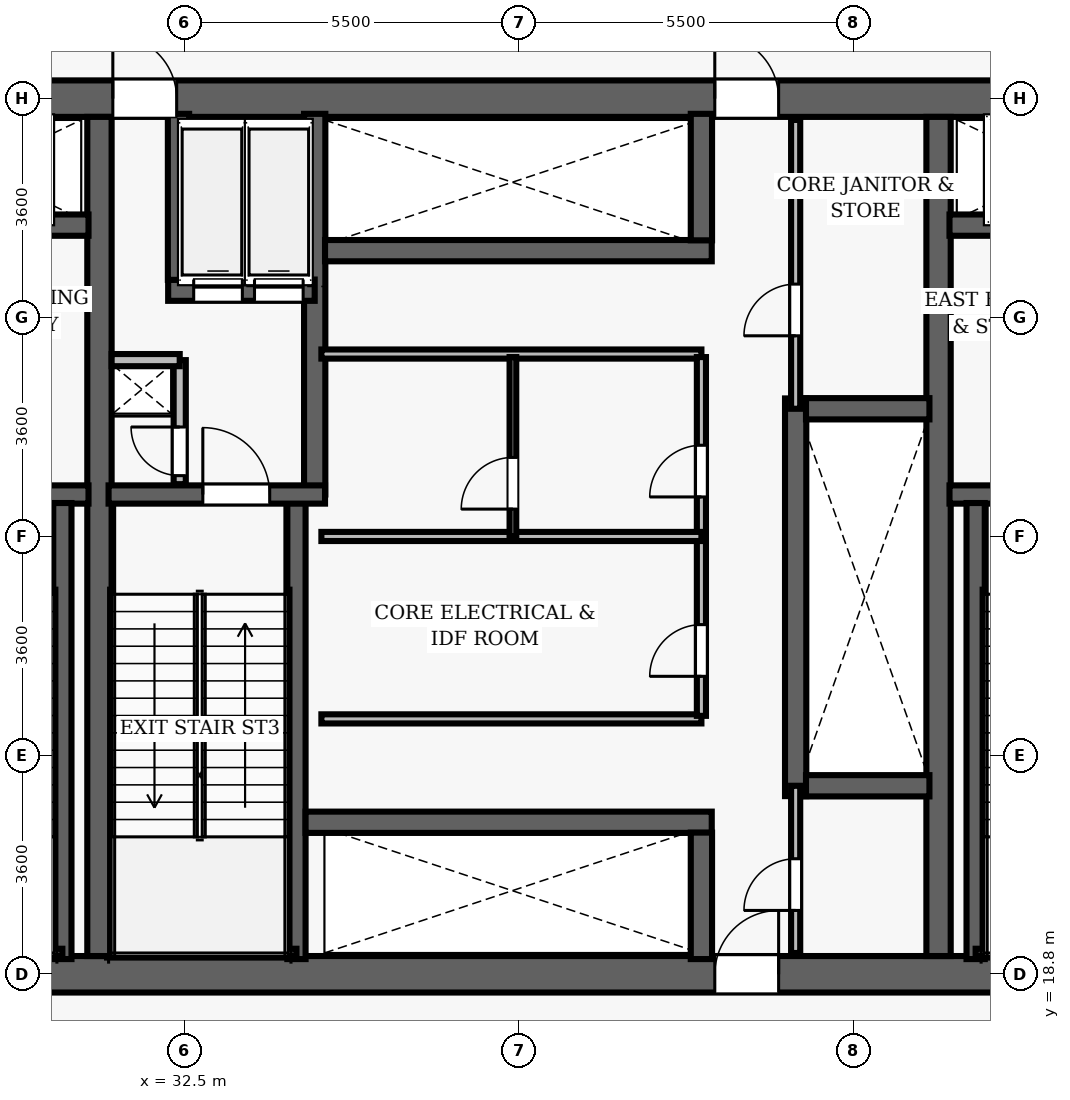
"""IFC4 building model, lengths in metres.
Left out: names, types, materials, properties, quantities, classifications, styles, units other than length and angle.
Written with IfcOpenShell. Run it as: python <this file> out.ifc"""

import sys

from ifc_helpers import new_model, si_unit, direction, frame, frame_2d, origin, place, context, subcontext, project, spatial, rectangle, extrude, element, fill, save


model = new_model("IFC4")
c1 = context("Model", 3, precision=1e-05, world=origin(), true_north=direction((0.0, 1.0)))
c2 = subcontext(c1, "Body", "Model", "MODEL_VIEW")
j1 = project(units=[si_unit("LENGTHUNIT", "METRE"), si_unit("PLANEANGLEUNIT", "RADIAN")], contexts=[c1])
p1 = place(None, origin())
s1 = spatial("IfcSite", under=j1, at=p1, CompositionType="ELEMENT")
p2 = place(p1, origin())
s2 = spatial("IfcBuilding", under=s1, at=p2, CompositionType="ELEMENT")
p3 = place(p2, frame((0.0, 0.0, 30.0)))
s3 = spatial("IfcBuildingStorey", under=s2, at=p3, CompositionType="ELEMENT", Elevation=30.0)
p4 = place(p3, frame((26.7, 18.8, 0.0), z_axis=(0.0, 0.0, 1.0), x_axis=(1.0, 0.0, 0.0)))
e1 = element("IfcWall", 1, at=p4, inside=s3, PredefinedType="SHEAR", context=c2, shape_type="SweptSolid", body=[
    extrude(rectangle(XDim=22.6, YDim=0.6, at=frame_2d((11.3, 0.0))), origin(), (0.0, 0.0, 1.0), 5.4),
])
p5 = place(p4, frame((14.52, 0.0, 0.0)))
e2 = element("IfcOpeningElement", 2, at=p5, cuts=e1, PredefinedType="OPENING", context=c2, shape_type="SweptSolid", body=[
    extrude(rectangle(XDim=1.05, YDim=2.15, at=frame_2d((0.525, 1.075))), frame((0.0, 0.31, 0.0), z_axis=(0.0, -1.0, 0.0), x_axis=(1.0, 0.0, 0.0)), (0.0, 0.0, 1.0), 0.62),
])
p6 = place(p3, frame((26.7, 33.2, 0.0), z_axis=(0.0, 0.0, 1.0), x_axis=(1.0, 0.0, 0.0)))
e3 = element("IfcWall", 3, at=p6, inside=s3, PredefinedType="SHEAR", context=c2, shape_type="SweptSolid", body=[
    extrude(rectangle(XDim=22.6, YDim=0.6, at=frame_2d((11.3, 0.0))), origin(), (0.0, 0.0, 1.0), 5.4),
])
p7 = place(p6, frame((4.62, 0.0, 0.0)))
e4 = element("IfcOpeningElement", 4, at=p7, cuts=e3, PredefinedType="OPENING", context=c2, shape_type="SweptSolid", body=[
    extrude(rectangle(XDim=1.05, YDim=2.15, at=frame_2d((0.525, 1.075))), frame((0.0, 0.31, 0.0), z_axis=(0.0, -1.0, 0.0), x_axis=(1.0, 0.0, 0.0)), (0.0, 0.0, 1.0), 0.62),
])
p8 = place(p6, frame((14.52, 0.0, 0.0)))
e5 = element("IfcOpeningElement", 5, at=p8, cuts=e3, PredefinedType="OPENING", context=c2, shape_type="SweptSolid", body=[
    extrude(rectangle(XDim=1.05, YDim=2.15, at=frame_2d((0.525, 1.075))), frame((0.0, 0.31, 0.0), z_axis=(0.0, -1.0, 0.0), x_axis=(1.0, 0.0, 0.0)), (0.0, 0.0, 1.0), 0.62),
])
for number, where, z_axis, x_axis in (
    (6, (31.1, 19.1, 0.0), (0.0, 0.0, 1.0), (0.0, 1.0, 0.0)),
    (7, (44.9, 19.1, 0.0), (0.0, 0.0, 1.0), (0.0, 1.0, 0.0)),
):
    element("IfcWall", number, at=place(p3, frame(where, z_axis=z_axis, x_axis=x_axis)), inside=s3, PredefinedType="SHEAR", context=c2, shape_type="SweptSolid", body=[
        extrude(rectangle(XDim=13.8, YDim=0.4, at=frame_2d((6.9, 0.0))), origin(), (0.0, 0.0, 1.0), 5.4),
    ])
p9 = place(p3, frame((27.25, 26.69, 0.0), z_axis=(0.0, 0.0, 1.0), x_axis=(1.0, 0.0, 0.0)))
e8 = element("IfcWall", 8, at=p9, inside=s3, PredefinedType="SHEAR", context=c2, shape_type="SweptSolid", body=[
    extrude(rectangle(XDim=3.67, YDim=0.3, at=frame_2d((1.835, 0.0))), origin(), (0.0, 0.0, 1.0), 5.4),
])
p10 = place(p9, frame((1.05, 0.0, 0.0)))
e9 = element("IfcOpeningElement", 9, at=p10, cuts=e8, PredefinedType="OPENING", context=c2, shape_type="SweptSolid", body=[
    extrude(rectangle(XDim=1.1, YDim=2.15, at=frame_2d((0.55, 1.075))), frame((0.0, 0.16, 0.0), z_axis=(0.0, -1.0, 0.0), x_axis=(1.0, 0.0, 0.0)), (0.0, 0.0, 1.0), 0.32),
])
p11 = place(p3, frame((30.49, 19.05, 0.0), z_axis=(0.0, 0.0, 1.0), x_axis=(0.0, 1.0, 0.0)))
e10 = element("IfcWall", 10, at=p11, inside=s3, PredefinedType="SHEAR", context=c2, shape_type="SweptSolid", body=[
    extrude(rectangle(XDim=7.5, YDim=0.3, at=frame_2d((3.75, 0.0))), origin(), (0.0, 0.0, 1.0), 5.4),
])
p12 = place(p3, frame((27.395, 19.16, 0.0), z_axis=(0.0, 0.0, 1.0), x_axis=(1.0, 0.0, 0.0)))
e11 = element("IfcWall", 11, at=p12, inside=s3, PredefinedType="SHEAR", context=c2, shape_type="SweptSolid", body=[
    extrude(rectangle(XDim=3.095, YDim=0.12, at=frame_2d((1.547, 0.0))), origin(), (0.0, 0.0, 1.0), 5.4),
])
p13 = place(p3, frame((27.25, 31.12, 0.0), z_axis=(0.0, 0.0, 1.0), x_axis=(1.0, 0.0, 0.0)))
e12 = element("IfcWall", 12, at=p13, inside=s3, PredefinedType="SHEAR", context=c2, shape_type="SweptSolid", body=[
    extrude(rectangle(XDim=3.67, YDim=0.35, at=frame_2d((1.835, 0.0))), origin(), (0.0, 0.0, 1.0), 4.06),
])
p14 = place(p13, frame((1.25, 0.0, 0.0)))
e13 = element("IfcOpeningElement", 13, at=p14, cuts=e12, PredefinedType="OPENING", context=c2, shape_type="SweptSolid", body=[
    extrude(rectangle(XDim=1.1, YDim=2.15, at=frame_2d((0.55, 1.075))), frame((0.0, 0.185, 0.0), z_axis=(0.0, -1.0, 0.0), x_axis=(1.0, 0.0, 0.0)), (0.0, 0.0, 1.0), 0.37),
])
p15 = place(p3, frame((45.08, 26.69, 0.0), z_axis=(0.0, 0.0, 1.0), x_axis=(1.0, 0.0, 0.0)))
e14 = element("IfcWall", 14, at=p15, inside=s3, PredefinedType="SHEAR", context=c2, shape_type="SweptSolid", body=[
    extrude(rectangle(XDim=3.67, YDim=0.3, at=frame_2d((1.835, 0.0))), origin(), (0.0, 0.0, 1.0), 5.4),
])
p16 = place(p15, frame((1.05, 0.0, 0.0)))
e15 = element("IfcOpeningElement", 15, at=p16, cuts=e14, PredefinedType="OPENING", context=c2, shape_type="SweptSolid", body=[
    extrude(rectangle(XDim=1.1, YDim=2.15, at=frame_2d((0.55, 1.075))), frame((0.0, 0.16, 0.0), z_axis=(0.0, -1.0, 0.0), x_axis=(1.0, 0.0, 0.0)), (0.0, 0.0, 1.0), 0.32),
])
p17 = place(p3, frame((45.51, 19.05, 0.0), z_axis=(0.0, 0.0, 1.0), x_axis=(0.0, 1.0, 0.0)))
e16 = element("IfcWall", 16, at=p17, inside=s3, PredefinedType="SHEAR", context=c2, shape_type="SweptSolid", body=[
    extrude(rectangle(XDim=7.5, YDim=0.3, at=frame_2d((3.75, 0.0))), origin(), (0.0, 0.0, 1.0), 5.4),
])
p18 = place(p3, frame((45.51, 19.16, 0.0), z_axis=(0.0, 0.0, 1.0), x_axis=(1.0, 0.0, 0.0)))
e17 = element("IfcWall", 17, at=p18, inside=s3, PredefinedType="SHEAR", context=c2, shape_type="SweptSolid", body=[
    extrude(rectangle(XDim=3.095, YDim=0.12, at=frame_2d((1.547, 0.0))), origin(), (0.0, 0.0, 1.0), 5.4),
])
p19 = place(p3, frame((45.08, 31.12, 0.0), z_axis=(0.0, 0.0, 1.0), x_axis=(1.0, 0.0, 0.0)))
e18 = element("IfcWall", 18, at=p19, inside=s3, PredefinedType="SHEAR", context=c2, shape_type="SweptSolid", body=[
    extrude(rectangle(XDim=3.67, YDim=0.35, at=frame_2d((1.835, 0.0))), origin(), (0.0, 0.0, 1.0), 4.06),
])
p20 = place(p19, frame((1.25, 0.0, 0.0)))
e19 = element("IfcOpeningElement", 19, at=p20, cuts=e18, PredefinedType="OPENING", context=c2, shape_type="SweptSolid", body=[
    extrude(rectangle(XDim=1.1, YDim=2.15, at=frame_2d((0.55, 1.075))), frame((0.0, 0.185, 0.0), z_axis=(0.0, -1.0, 0.0), x_axis=(1.0, 0.0, 0.0)), (0.0, 0.0, 1.0), 0.37),
])
p21 = place(p3, frame((34.34, 19.05, 0.0), z_axis=(0.0, 0.0, 1.0), x_axis=(0.0, 1.0, 0.0)))
e20 = element("IfcWall", 20, at=p21, inside=s3, PredefinedType="SHEAR", context=c2, shape_type="SweptSolid", body=[
    extrude(rectangle(XDim=7.5, YDim=0.3, at=frame_2d((3.75, 0.0))), origin(), (0.0, 0.0, 1.0), 5.4),
])
p22 = place(p3, frame((34.64, 26.69, 0.0), z_axis=(0.0, 0.0, 1.0), x_axis=(0.0, 1.0, 0.0)))
e21 = element("IfcWall", 21, at=p22, inside=s3, PredefinedType="SHEAR", context=c2, shape_type="SweptSolid", body=[
    extrude(rectangle(XDim=6.26, YDim=0.35, at=frame_2d((3.13, 0.0))), origin(), (0.0, 0.0, 1.0), 5.4),
])
p23 = place(p3, frame((31.25, 26.69, 0.0), z_axis=(0.0, 0.0, 1.0), x_axis=(1.0, 0.0, 0.0)))
e22 = element("IfcWall", 22, at=p23, inside=s3, PredefinedType="SHEAR", context=c2, shape_type="SweptSolid", body=[
    extrude(rectangle(XDim=3.56, YDim=0.3, at=frame_2d((1.78, 0.0))), origin(), (0.0, 0.0, 1.0), 5.4),
])
p24 = place(p23, frame((1.55, 0.0, 0.0)))
e23 = element("IfcOpeningElement", 23, at=p24, cuts=e22, PredefinedType="OPENING", context=c2, shape_type="SweptSolid", body=[
    extrude(rectangle(XDim=1.1, YDim=2.15, at=frame_2d((0.55, 1.075))), frame((0.0, 0.16, 0.0), z_axis=(0.0, -1.0, 0.0), x_axis=(1.0, 0.0, 0.0)), (0.0, 0.0, 1.0), 0.32),
])
p25 = place(p3, frame((31.3, 19.16, 0.0), z_axis=(0.0, 0.0, 1.0), x_axis=(1.0, 0.0, 0.0)))
e24 = element("IfcWall", 24, at=p25, inside=s3, PredefinedType="SHEAR", context=c2, shape_type="SweptSolid", body=[
    extrude(rectangle(XDim=3.04, YDim=0.12, at=frame_2d((1.52, 0.0))), origin(), (0.0, 0.0, 1.0), 5.4),
])
p26 = place(p3, frame((32.23, 30.05, 0.0), z_axis=(0.0, 0.0, 1.0), x_axis=(1.0, 0.0, 0.0)))
e25 = element("IfcWall", 25, at=p26, inside=s3, PredefinedType="SHEAR", context=c2, shape_type="SweptSolid", body=[
    extrude(rectangle(XDim=2.41, YDim=0.35, at=frame_2d((1.205, 0.0))), origin(), (0.0, 0.0, 1.0), 4.06),
])
p27 = place(p26, frame((0.42, 0.0, 0.0)))
e26 = element("IfcOpeningElement", 26, at=p27, cuts=e25, PredefinedType="OPENING", context=c2, shape_type="SweptSolid", body=[
    extrude(rectangle(XDim=0.8, YDim=2.15, at=frame_2d((0.4, 1.075))), frame((0.0, 0.185, 0.0), z_axis=(0.0, -1.0, 0.0), x_axis=(1.0, 0.0, 0.0)), (0.0, 0.0, 1.0), 0.37),
])
p28 = place(p26, frame((1.42, 0.0, 0.0)))
e27 = element("IfcOpeningElement", 27, at=p28, cuts=e25, PredefinedType="OPENING", context=c2, shape_type="SweptSolid", body=[
    extrude(rectangle(XDim=0.8, YDim=2.15, at=frame_2d((0.4, 1.075))), frame((0.0, 0.185, 0.0), z_axis=(0.0, -1.0, 0.0), x_axis=(1.0, 0.0, 0.0)), (0.0, 0.0, 1.0), 0.37),
])
p29 = place(p3, frame((32.4, 30.22, 0.0), z_axis=(0.0, 0.0, 1.0), x_axis=(0.0, 1.0, 0.0)))
e28 = element("IfcWall", 28, at=p29, inside=s3, PredefinedType="SHEAR", context=c2, shape_type="SweptSolid", body=[
    extrude(rectangle(XDim=2.73, YDim=0.35, at=frame_2d((1.365, 0.0))), origin(), (0.0, 0.0, 1.0), 4.06),
])
p30 = place(p3, frame((32.42, 26.86, 0.0), z_axis=(0.0, 0.0, 1.0), x_axis=(0.0, 1.0, 0.0)))
e29 = element("IfcWall", 29, at=p30, inside=s3, PredefinedType="PARTITIONING", context=c2, shape_type="SweptSolid", body=[
    extrude(rectangle(XDim=2.04, YDim=0.2, at=frame_2d((1.02, 0.0))), origin(), (0.0, 0.0, 1.0), 4.06),
])
p31 = place(p30, frame((0.14, 0.0, 0.0)))
e30 = element("IfcOpeningElement", 30, at=p31, cuts=e29, PredefinedType="OPENING", context=c2, shape_type="SweptSolid", body=[
    extrude(rectangle(XDim=0.8, YDim=2.05, at=frame_2d((0.4, 1.025))), frame((0.0, 0.11, 0.0), z_axis=(0.0, -1.0, 0.0), x_axis=(1.0, 0.0, 0.0)), (0.0, 0.0, 1.0), 0.22),
])
p32 = place(p3, frame((31.3, 28.9, 0.0), z_axis=(0.0, 0.0, 1.0), x_axis=(1.0, 0.0, 0.0)))
e31 = element("IfcWall", 31, at=p32, inside=s3, PredefinedType="PARTITIONING", context=c2, shape_type="SweptSolid", body=[
    extrude(rectangle(XDim=1.12, YDim=0.2, at=frame_2d((0.56, 0.0))), origin(), (0.0, 0.0, 1.0), 4.06),
])
p33 = place(p3, frame((42.55, 21.73, 0.0), z_axis=(0.0, 0.0, 1.0), x_axis=(0.0, 1.0, 0.0)))
e32 = element("IfcWall", 32, at=p33, inside=s3, PredefinedType="SHEAR", context=c2, shape_type="SweptSolid", body=[
    extrude(rectangle(XDim=6.54, YDim=0.35, at=frame_2d((3.27, 0.0))), origin(), (0.0, 0.0, 1.0), 4.06),
])
for number, where, z_axis, x_axis in (
    (33, (42.72, 21.9, 0.0), (0.0, 0.0, 1.0), (1.0, 0.0, 0.0)),
    (34, (42.72, 28.1, 0.0), (0.0, 0.0, 1.0), (1.0, 0.0, 0.0)),
):
    element("IfcWall", number, at=place(p3, frame(where, z_axis=z_axis, x_axis=x_axis)), inside=s3, PredefinedType="SHEAR", context=c2, shape_type="SweptSolid", body=[
        extrude(rectangle(XDim=2.03, YDim=0.35, at=frame_2d((1.015, 0.0))), origin(), (0.0, 0.0, 1.0), 4.06),
    ])
p34 = place(p3, frame((34.81, 30.7, 0.0), z_axis=(0.0, 0.0, 1.0), x_axis=(1.0, 0.0, 0.0)))
e35 = element("IfcWall", 35, at=p34, inside=s3, PredefinedType="SHEAR", context=c2, shape_type="SweptSolid", body=[
    extrude(rectangle(XDim=6.36, YDim=0.35, at=frame_2d((3.18, 0.0))), origin(), (0.0, 0.0, 1.0), 4.06),
])
p35 = place(p3, frame((41.0, 30.87, 0.0), z_axis=(0.0, 0.0, 1.0), x_axis=(0.0, 1.0, 0.0)))
e36 = element("IfcWall", 36, at=p35, inside=s3, PredefinedType="SHEAR", context=c2, shape_type="SweptSolid", body=[
    extrude(rectangle(XDim=2.08, YDim=0.35, at=frame_2d((1.04, 0.0))), origin(), (0.0, 0.0, 1.0), 4.06),
])
p36 = place(p3, frame((34.49, 21.3, 0.0), z_axis=(0.0, 0.0, 1.0), x_axis=(1.0, 0.0, 0.0)))
e37 = element("IfcWall", 37, at=p36, inside=s3, PredefinedType="SHEAR", context=c2, shape_type="SweptSolid", body=[
    extrude(rectangle(XDim=6.68, YDim=0.35, at=frame_2d((3.34, 0.0))), origin(), (0.0, 0.0, 1.0), 4.06),
])
p37 = place(p3, frame((41.0, 19.05, 0.0), z_axis=(0.0, 0.0, 1.0), x_axis=(0.0, 1.0, 0.0)))
e38 = element("IfcWall", 38, at=p37, inside=s3, PredefinedType="SHEAR", context=c2, shape_type="SweptSolid", body=[
    extrude(rectangle(XDim=2.08, YDim=0.35, at=frame_2d((1.04, 0.0))), origin(), (0.0, 0.0, 1.0), 4.06),
])
for number, where, z_axis, x_axis in (
    (39, (34.75, 29.0, 0.0), (0.0, 0.0, 1.0), (1.0, 0.0, 0.0)),
    (40, (34.75, 23.0, 0.0), (0.0, 0.0, 1.0), (1.0, 0.0, 0.0)),
):
    element("IfcWall", number, at=place(p3, frame(where, z_axis=z_axis, x_axis=x_axis)), inside=s3, PredefinedType="PARTITIONING", context=c2, shape_type="SweptSolid", body=[
        extrude(rectangle(XDim=6.25, YDim=0.15, at=frame_2d((3.125, 0.0))), origin(), (0.0, 0.0, 1.0), 4.06),
    ])
p38 = place(p3, frame((41.0, 23.05, 0.0), z_axis=(0.0, 0.0, 1.0), x_axis=(0.0, 1.0, 0.0)))
e41 = element("IfcWall", 41, at=p38, inside=s3, PredefinedType="PARTITIONING", context=c2, shape_type="SweptSolid", body=[
    extrude(rectangle(XDim=5.9, YDim=0.15, at=frame_2d((2.95, 0.0))), origin(), (0.0, 0.0, 1.0), 4.06),
])
p39 = place(p38, frame((0.65, 0.0, 0.0)))
e42 = element("IfcOpeningElement", 42, at=p39, cuts=e41, PredefinedType="OPENING", context=c2, shape_type="SweptSolid", body=[
    extrude(rectangle(XDim=0.85, YDim=2.1, at=frame_2d((0.425, 1.05))), frame((0.0, 0.085, 0.0), z_axis=(0.0, -1.0, 0.0), x_axis=(1.0, 0.0, 0.0)), (0.0, 0.0, 1.0), 0.17),
])
p40 = place(p38, frame((3.6, 0.0, 0.0)))
e43 = element("IfcOpeningElement", 43, at=p40, cuts=e41, PredefinedType="OPENING", context=c2, shape_type="SweptSolid", body=[
    extrude(rectangle(XDim=0.85, YDim=2.1, at=frame_2d((0.425, 1.05))), frame((0.0, 0.085, 0.0), z_axis=(0.0, -1.0, 0.0), x_axis=(1.0, 0.0, 0.0)), (0.0, 0.0, 1.0), 0.17),
])
p41 = place(p3, frame((34.75, 26.0, 0.0), z_axis=(0.0, 0.0, 1.0), x_axis=(1.0, 0.0, 0.0)))
e44 = element("IfcWall", 44, at=p41, inside=s3, PredefinedType="PARTITIONING", context=c2, shape_type="SweptSolid", body=[
    extrude(rectangle(XDim=6.25, YDim=0.15, at=frame_2d((3.125, 0.0))), origin(), (0.0, 0.0, 1.0), 4.06),
])
p42 = place(p3, frame((37.9, 26.0, 0.0), z_axis=(0.0, 0.0, 1.0), x_axis=(0.0, 1.0, 0.0)))
e45 = element("IfcWall", 45, at=p42, inside=s3, PredefinedType="PARTITIONING", context=c2, shape_type="SweptSolid", body=[
    extrude(rectangle(XDim=2.95, YDim=0.11, at=frame_2d((1.475, 0.0))), origin(), (0.0, 0.0, 1.0), 4.06),
])
p43 = place(p42, frame((0.45, 0.0, 0.0)))
e46 = element("IfcOpeningElement", 46, at=p43, cuts=e45, PredefinedType="OPENING", context=c2, shape_type="SweptSolid", body=[
    extrude(rectangle(XDim=0.85, YDim=2.1, at=frame_2d((0.425, 1.05))), frame((0.0, 0.065, 0.0), z_axis=(0.0, -1.0, 0.0), x_axis=(1.0, 0.0, 0.0)), (0.0, 0.0, 1.0), 0.13),
])
p44 = place(p3, frame((42.55, 28.1, 0.0), z_axis=(0.0, 0.0, 1.0), x_axis=(0.0, 1.0, 0.0)))
e47 = element("IfcWall", 47, at=p44, inside=s3, PredefinedType="PARTITIONING", context=c2, shape_type="SweptSolid", body=[
    extrude(rectangle(XDim=4.75, YDim=0.15, at=frame_2d((2.375, 0.0))), origin(), (0.0, 0.0, 1.0), 4.06),
])
p45 = place(p44, frame((1.2, 0.0, 0.0)))
e48 = element("IfcOpeningElement", 48, at=p45, cuts=e47, PredefinedType="OPENING", context=c2, shape_type="SweptSolid", body=[
    extrude(rectangle(XDim=0.85, YDim=2.1, at=frame_2d((0.425, 1.05))), frame((0.0, 0.085, 0.0), z_axis=(0.0, -1.0, 0.0), x_axis=(1.0, 0.0, 0.0)), (0.0, 0.0, 1.0), 0.17),
])
p46 = place(p3, frame((42.55, 19.15, 0.0), z_axis=(0.0, 0.0, 1.0), x_axis=(0.0, 1.0, 0.0)))
e49 = element("IfcWall", 49, at=p46, inside=s3, PredefinedType="PARTITIONING", context=c2, shape_type="SweptSolid", body=[
    extrude(rectangle(XDim=2.75, YDim=0.15, at=frame_2d((1.375, 0.0))), origin(), (0.0, 0.0, 1.0), 4.06),
])
p47 = place(p46, frame((0.7, 0.0, 0.0)))
e50 = element("IfcOpeningElement", 50, at=p47, cuts=e49, PredefinedType="OPENING", context=c2, shape_type="SweptSolid", body=[
    extrude(rectangle(XDim=0.85, YDim=2.1, at=frame_2d((0.425, 1.05))), frame((0.0, 0.085, 0.0), z_axis=(0.0, -1.0, 0.0), x_axis=(1.0, 0.0, 0.0)), (0.0, 0.0, 1.0), 0.17),
])
p48 = place(p24, origin())
e51 = element("IfcDoor", 51, at=p48, inside=s3, OperationType="SINGLE_SWING_LEFT", PredefinedType="DOOR", context=c2, shape_type="SweptSolid", body=[
    extrude(rectangle(XDim=1.1, YDim=2.15, at=frame_2d((0.55, 1.075))), frame((0.0, 0.025, 0.0), z_axis=(0.0, -1.0, 0.0), x_axis=(1.0, 0.0, 0.0)), (0.0, 0.0, 1.0), 0.05),
])
fill(e23, e51)
p49 = place(p31, origin())
e52 = element("IfcDoor", 52, at=p49, inside=s3, OperationType="SINGLE_SWING_RIGHT", PredefinedType="DOOR", context=c2, shape_type="SweptSolid", body=[
    extrude(rectangle(XDim=0.8, YDim=2.05, at=frame_2d((0.4, 1.025))), frame((0.0, 0.025, 0.0), z_axis=(0.0, -1.0, 0.0), x_axis=(1.0, 0.0, 0.0)), (0.0, 0.0, 1.0), 0.05),
])
fill(e30, e52)
p50 = place(p7, origin())
e53 = element("IfcDoor", 53, at=p50, inside=s3, OperationType="SINGLE_SWING_LEFT", PredefinedType="DOOR", context=c2, shape_type="SweptSolid", body=[
    extrude(rectangle(XDim=1.05, YDim=2.15, at=frame_2d((0.525, 1.075))), frame((0.0, 0.025, 0.0), z_axis=(0.0, -1.0, 0.0), x_axis=(1.0, 0.0, 0.0)), (0.0, 0.0, 1.0), 0.05),
])
fill(e4, e53)
p51 = place(p8, origin())
e54 = element("IfcDoor", 54, at=p51, inside=s3, OperationType="SINGLE_SWING_LEFT", PredefinedType="DOOR", context=c2, shape_type="SweptSolid", body=[
    extrude(rectangle(XDim=1.05, YDim=2.15, at=frame_2d((0.525, 1.075))), frame((0.0, 0.025, 0.0), z_axis=(0.0, -1.0, 0.0), x_axis=(1.0, 0.0, 0.0)), (0.0, 0.0, 1.0), 0.05),
])
fill(e5, e54)
p52 = place(p5, origin())
e55 = element("IfcDoor", 55, at=p52, inside=s3, OperationType="SINGLE_SWING_RIGHT", PredefinedType="DOOR", context=c2, shape_type="SweptSolid", body=[
    extrude(rectangle(XDim=1.05, YDim=2.15, at=frame_2d((0.525, 1.075))), frame((0.0, 0.025, 0.0), z_axis=(0.0, -1.0, 0.0), x_axis=(1.0, 0.0, 0.0)), (0.0, 0.0, 1.0), 0.05),
])
fill(e2, e55)
p53 = place(p39, origin())
e56 = element("IfcDoor", 56, at=p53, inside=s3, OperationType="SINGLE_SWING_LEFT", PredefinedType="DOOR", context=c2, shape_type="SweptSolid", body=[
    extrude(rectangle(XDim=0.85, YDim=2.1, at=frame_2d((0.425, 1.05))), frame((0.0, 0.025, 0.0), z_axis=(0.0, -1.0, 0.0), x_axis=(1.0, 0.0, 0.0)), (0.0, 0.0, 1.0), 0.05),
])
fill(e42, e56)
p54 = place(p40, origin())
e57 = element("IfcDoor", 57, at=p54, inside=s3, OperationType="SINGLE_SWING_LEFT", PredefinedType="DOOR", context=c2, shape_type="SweptSolid", body=[
    extrude(rectangle(XDim=0.85, YDim=2.1, at=frame_2d((0.425, 1.05))), frame((0.0, 0.025, 0.0), z_axis=(0.0, -1.0, 0.0), x_axis=(1.0, 0.0, 0.0)), (0.0, 0.0, 1.0), 0.05),
])
fill(e43, e57)
p55 = place(p43, origin())
e58 = element("IfcDoor", 58, at=p55, inside=s3, OperationType="SINGLE_SWING_LEFT", PredefinedType="DOOR", context=c2, shape_type="SweptSolid", body=[
    extrude(rectangle(XDim=0.85, YDim=2.1, at=frame_2d((0.425, 1.05))), frame((0.0, 0.025, 0.0), z_axis=(0.0, -1.0, 0.0), x_axis=(1.0, 0.0, 0.0)), (0.0, 0.0, 1.0), 0.05),
])
fill(e46, e58)
p56 = place(p45, origin())
e59 = element("IfcDoor", 59, at=p56, inside=s3, OperationType="SINGLE_SWING_LEFT", PredefinedType="DOOR", context=c2, shape_type="SweptSolid", body=[
    extrude(rectangle(XDim=0.85, YDim=2.1, at=frame_2d((0.425, 1.05))), frame((0.0, 0.025, 0.0), z_axis=(0.0, -1.0, 0.0), x_axis=(1.0, 0.0, 0.0)), (0.0, 0.0, 1.0), 0.05),
])
fill(e48, e59)
p57 = place(p47, origin())
e60 = element("IfcDoor", 60, at=p57, inside=s3, OperationType="SINGLE_SWING_LEFT", PredefinedType="DOOR", context=c2, shape_type="SweptSolid", body=[
    extrude(rectangle(XDim=0.85, YDim=2.1, at=frame_2d((0.425, 1.05))), frame((0.0, 0.025, 0.0), z_axis=(0.0, -1.0, 0.0), x_axis=(1.0, 0.0, 0.0)), (0.0, 0.0, 1.0), 0.05),
])
fill(e50, e60)
p58 = place(p27, origin())
e61 = element("IfcDoor", 61, at=p58, inside=s3, OperationType="SLIDING_TO_LEFT", PredefinedType="DOOR", context=c2, shape_type="SweptSolid", body=[
    extrude(rectangle(XDim=0.8, YDim=2.15, at=frame_2d((0.4, 1.075))), frame((0.0, 0.025, 0.0), z_axis=(0.0, -1.0, 0.0), x_axis=(1.0, 0.0, 0.0)), (0.0, 0.0, 1.0), 0.05),
])
fill(e26, e61)
p59 = place(p28, origin())
e62 = element("IfcDoor", 62, at=p59, inside=s3, OperationType="SLIDING_TO_LEFT", PredefinedType="DOOR", context=c2, shape_type="SweptSolid", body=[
    extrude(rectangle(XDim=0.8, YDim=2.15, at=frame_2d((0.4, 1.075))), frame((0.0, 0.025, 0.0), z_axis=(0.0, -1.0, 0.0), x_axis=(1.0, 0.0, 0.0)), (0.0, 0.0, 1.0), 0.05),
])
fill(e27, e62)
save(model, sys.argv[1])
